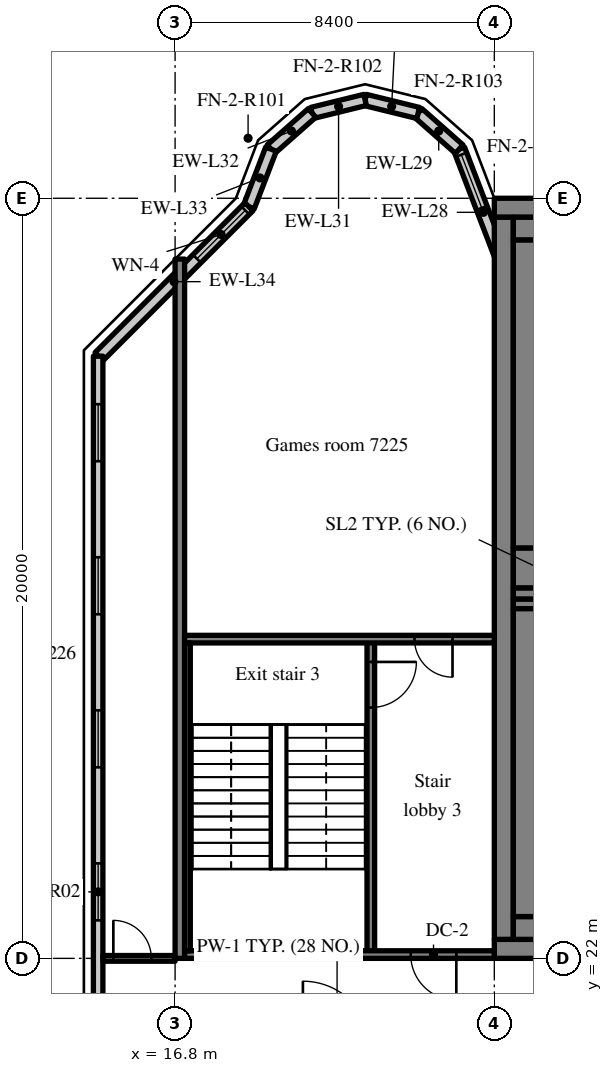
"""IFC4 building model, lengths in metres.
Left out: names, types, materials, properties, quantities, classifications, styles, units other than length and angle.
Written with IfcOpenShell. Run it as: python <this file> out.ifc"""

import sys

from ifc_helpers import new_model, si_unit, direction, frame, frame_2d, origin, place, context, subcontext, project, spatial, rectangle, extrude, source, transform, mapped, element, fill, save


model = new_model("IFC4")
c1 = context("Model", 3, precision=1e-05, world=origin(), true_north=direction((0.0, 1.0)))
c2 = subcontext(c1, "Body", "Model", "MODEL_VIEW")
j1 = project(units=[si_unit("LENGTHUNIT", "METRE"), si_unit("PLANEANGLEUNIT", "RADIAN")], contexts=[c1])
p1 = place(None, origin())
s1 = spatial("IfcSite", under=j1, at=p1, CompositionType="ELEMENT")
p2 = place(p1, origin())
s2 = spatial("IfcBuilding", under=s1, at=p2, CompositionType="ELEMENT")
p3 = place(p2, frame((0.0, 0.0, 301.7)))
s3 = spatial("IfcBuildingStorey", under=s2, at=p3, CompositionType="ELEMENT", Elevation=301.7)
m1 = source(origin(), c2, "Body", "SweptSolid", [
    extrude(rectangle(XDim=50.4, YDim=0.5, at=frame_2d((25.2, 0.0))), origin(), (0.0, 0.0, 1.0), 3.72),
])
p4 = place(p3, frame((25.2, 22.25, 0.0), z_axis=(0.0, 0.0, 1.0), x_axis=(1.0, 0.0, 0.0)))
e1 = element("IfcWall", 1, at=p4, inside=s3, PredefinedType="SHEAR", context=c2, shape_type="MappedRepresentation", body=[
    mapped(m1, transform((0.0, 0.0, 0.0), scale=1.0)),
])
m2 = source(origin(), c2, "Body", "SweptSolid", [
    extrude(rectangle(XDim=1.8, YDim=2.1, at=frame_2d((0.9, 1.05))), frame((0.0, 0.26, 0.0), z_axis=(0.0, -1.0, 0.0), x_axis=(1.0, 0.0, 0.0)), (0.0, 0.0, 1.0), 0.52),
])
p5 = place(p4, frame((15.9, 0.0, 0.0)))
e2 = element("IfcOpeningElement", 2, at=p5, cuts=e1, PredefinedType="OPENING", context=c2, shape_type="MappedRepresentation", body=[
    mapped(m2, transform((0.0, 0.0, 0.0), scale=1.0)),
])
m3 = source(origin(), c2, "Body", "SweptSolid", [
    extrude(rectangle(XDim=0.9, YDim=2.1, at=frame_2d((0.45, 1.05))), frame((0.0, 0.26, 0.0), z_axis=(0.0, -1.0, 0.0), x_axis=(1.0, 0.0, 0.0)), (0.0, 0.0, 1.0), 0.52),
])
p6 = place(p4, frame((11.175, 0.0, 0.0)))
e3 = element("IfcOpeningElement", 3, at=p6, cuts=e1, PredefinedType="OPENING", context=c2, shape_type="MappedRepresentation", body=[
    mapped(m3, transform((0.0, 0.0, 0.0), scale=1.0)),
])
p7 = place(p4, frame((21.525, 0.0, 0.0)))
e4 = element("IfcOpeningElement", 4, at=p7, cuts=e1, PredefinedType="OPENING", context=c2, shape_type="MappedRepresentation", body=[
    mapped(m3, transform((0.0, 0.0, 0.0), scale=1.0)),
])
p8 = place(p4, frame((32.7, 0.0, 0.0)))
e5 = element("IfcOpeningElement", 5, at=p8, cuts=e1, PredefinedType="OPENING", context=c2, shape_type="MappedRepresentation", body=[
    mapped(m2, transform((0.0, 0.0, 0.0), scale=1.0)),
])
m4 = source(origin(), c2, "Body", "SweptSolid", [
    extrude(rectangle(XDim=1.2, YDim=2.1, at=frame_2d((0.6, 1.05))), frame((0.0, 0.26, 0.0), z_axis=(0.0, -1.0, 0.0), x_axis=(1.0, 0.0, 0.0)), (0.0, 0.0, 1.0), 0.52),
])
p9 = place(p4, frame((6.5, 0.0, 0.0)))
e6 = element("IfcOpeningElement", 6, at=p9, cuts=e1, PredefinedType="OPENING", context=c2, shape_type="MappedRepresentation", body=[
    mapped(m4, transform((0.0, 0.0, 0.0), scale=1.0)),
])
p10 = place(p4, frame((47.975, 0.0, 0.0)))
e7 = element("IfcOpeningElement", 7, at=p10, cuts=e1, PredefinedType="OPENING", context=c2, shape_type="MappedRepresentation", body=[
    mapped(m4, transform((0.0, 0.0, 0.0), scale=1.0)),
])
p11 = place(p3, frame((25.2, 41.75, 0.0), z_axis=(0.0, 0.0, 1.0), x_axis=(1.0, 0.0, 0.0)))
e8 = element("IfcWall", 8, at=p11, inside=s3, PredefinedType="SHEAR", context=c2, shape_type="MappedRepresentation", body=[
    mapped(m1, transform((0.0, 0.0, 0.0), scale=1.0)),
])
m5 = source(origin(), c2, "Body", "SweptSolid", [
    extrude(rectangle(XDim=19.0, YDim=0.5, at=frame_2d((9.5, 0.0))), origin(), (0.0, 0.0, 1.0), 3.72),
])
p12 = place(p3, frame((25.45, 22.5, 0.0), z_axis=(0.0, 0.0, 1.0), x_axis=(0.0, 1.0, 0.0)))
e9 = element("IfcWall", 9, at=p12, inside=s3, PredefinedType="SHEAR", context=c2, shape_type="MappedRepresentation", body=[
    mapped(m5, transform((0.0, 0.0, 0.0), scale=1.0)),
])
m6 = source(origin(), c2, "Body", "SweptSolid", [
    extrude(rectangle(XDim=7.75, YDim=0.3, at=frame_2d((3.875, 0.0))), origin(), (0.0, 0.0, 1.0), 3.72),
])
p13 = place(p3, frame((25.7, 31.6, 0.0), z_axis=(0.0, 0.0, 1.0), x_axis=(1.0, 0.0, 0.0)))
e10 = element("IfcWall", 10, at=p13, inside=s3, PredefinedType="SHEAR", context=c2, shape_type="MappedRepresentation", body=[
    mapped(m6, transform((0.0, 0.0, 0.0), scale=1.0)),
])
m7 = source(origin(), c2, "Body", "SweptSolid", [
    extrude(rectangle(XDim=1.1, YDim=2.1, at=frame_2d((0.55, 1.05))), frame((0.0, 0.16, 0.0), z_axis=(0.0, -1.0, 0.0), x_axis=(1.0, 0.0, 0.0)), (0.0, 0.0, 1.0), 0.32),
])
p14 = place(p13, frame((6.05, 0.0, 0.0)))
e11 = element("IfcOpeningElement", 11, at=p14, cuts=e10, PredefinedType="OPENING", context=c2, shape_type="MappedRepresentation", body=[
    mapped(m7, transform((0.0, 0.0, 0.0), scale=1.0)),
])
m8 = source(origin(), c2, "Body", "SweptSolid", [
    extrude(rectangle(XDim=18.4, YDim=0.25, at=frame_2d((9.2, 0.0))), origin(), (0.0, 0.0, 1.0), 3.72),
])
p15 = place(p3, frame((16.925, 22.0, 0.0), z_axis=(0.0, 0.0, 1.0), x_axis=(0.0, 1.0, 0.0)))
e12 = element("IfcWall", 12, at=p15, inside=s3, PredefinedType="SHEAR", context=c2, shape_type="MappedRepresentation", body=[
    mapped(m8, transform((0.0, 0.0, 0.0), scale=1.0)),
])
m9 = source(origin(), c2, "Body", "SweptSolid", [
    extrude(rectangle(XDim=3.559, YDim=0.3, at=frame_2d((1.78, 0.0))), origin(), (0.0, 0.0, 1.0), 3.72),
])
p16 = place(p3, frame((25.55, 39.969, 0.0), z_axis=(0.0, 0.0, 1.0), x_axis=(-0.35779745313, 0.933799219604, 0.0)))
e13 = element("IfcWall", 13, at=p16, inside=s3, PredefinedType="SOLIDWALL", context=c2, shape_type="MappedRepresentation", body=[
    mapped(m9, transform((0.0, 0.0, 0.0), scale=1.0)),
])
m10 = source(origin(), c2, "Body", "SweptSolid", [
    extrude(rectangle(XDim=1.5, YDim=2.0, at=frame_2d((0.75, 1.0))), frame((0.0, 0.16, 0.0), z_axis=(0.0, -1.0, 0.0), x_axis=(1.0, 0.0, 0.0)), (0.0, 0.0, 1.0), 0.32),
])
p17 = place(p16, frame((1.903, 0.0, 0.9)))
e14 = element("IfcOpeningElement", 14, at=p17, cuts=e13, PredefinedType="OPENING", context=c2, shape_type="MappedRepresentation", body=[
    mapped(m10, transform((0.0, 0.0, 0.0), scale=1.0)),
])
m11 = source(origin(), c2, "Body", "SweptSolid", [
    extrude(rectangle(XDim=1.44, YDim=0.3, at=frame_2d((0.72, 0.0))), origin(), (0.0, 0.0, 1.0), 3.72),
])
p18 = place(p3, frame((24.277, 43.292, 0.0), z_axis=(0.0, 0.0, 1.0), x_axis=(-0.749649827867, 0.661834673902, 0.0)))
e15 = element("IfcWall", 15, at=p18, inside=s3, PredefinedType="SOLIDWALL", context=c2, shape_type="MappedRepresentation", body=[
    mapped(m11, transform((0.0, 0.0, 0.0), scale=1.0)),
])
m12 = source(origin(), c2, "Body", "SweptSolid", [
    extrude(rectangle(XDim=1.438, YDim=0.3, at=frame_2d((0.719, 0.0))), origin(), (0.0, 0.0, 1.0), 3.72),
])
p19 = place(p3, frame((23.197, 44.245, 0.0), z_axis=(0.0, 0.0, 1.0), x_axis=(-0.971152283879, 0.238460146601, 0.0)))
e16 = element("IfcWall", 16, at=p19, inside=s3, PredefinedType="SOLIDWALL", context=c2, shape_type="MappedRepresentation", body=[
    mapped(m12, transform((0.0, 0.0, 0.0), scale=1.0)),
])
m13 = source(origin(), c2, "Body", "SweptSolid", [
    extrude(rectangle(XDim=1.439, YDim=0.3, at=frame_2d((0.719, 0.0))), origin(), (0.0, 0.0, 1.0), 3.72),
])
p20 = place(p3, frame((21.8, 44.588, 0.0), z_axis=(0.0, 0.0, 1.0), x_axis=(-0.971161932466, -0.238420848351, 0.0)))
e17 = element("IfcWall", 17, at=p20, inside=s3, PredefinedType="SOLIDWALL", context=c2, shape_type="MappedRepresentation", body=[
    mapped(m13, transform((0.0, 0.0, 0.0), scale=1.0)),
])
m14 = source(origin(), c2, "Body", "SweptSolid", [
    extrude(rectangle(XDim=1.44, YDim=0.3, at=frame_2d((0.72, 0.0))), origin(), (0.0, 0.0, 1.0), 3.72),
])
p21 = place(p3, frame((20.403, 44.245, 0.0), z_axis=(0.0, 0.0, 1.0), x_axis=(-0.74957555648, -0.661918790432, 0.0)))
e18 = element("IfcWall", 18, at=p21, inside=s3, PredefinedType="SOLIDWALL", context=c2, shape_type="MappedRepresentation", body=[
    mapped(m14, transform((0.0, 0.0, 0.0), scale=1.0)),
])
m15 = source(origin(), c2, "Body", "SweptSolid", [
    extrude(rectangle(XDim=1.622, YDim=0.3, at=frame_2d((0.811, 0.0))), origin(), (0.0, 0.0, 1.0), 3.72),
])
p22 = place(p3, frame((19.323, 43.292, 0.0), z_axis=(0.0, 0.0, 1.0), x_axis=(-0.357778527068, -0.933806471154, 0.0)))
e19 = element("IfcWall", 19, at=p22, inside=s3, PredefinedType="SOLIDWALL", context=c2, shape_type="MappedRepresentation", body=[
    mapped(m15, transform((0.0, 0.0, 0.0), scale=1.0)),
])
m16 = source(origin(), c2, "Body", "SweptSolid", [
    extrude(rectangle(XDim=5.576, YDim=0.3, at=frame_2d((2.788, 0.0))), origin(), (0.0, 0.0, 1.0), 3.72),
])
p23 = place(p3, frame((18.743, 41.777, 0.0), z_axis=(0.0, 0.0, 1.0), x_axis=(-0.707106781187, -0.707106781187, 0.0)))
e20 = element("IfcWall", 20, at=p23, inside=s3, PredefinedType="SOLIDWALL", context=c2, shape_type="MappedRepresentation", body=[
    mapped(m16, transform((0.0, 0.0, 0.0), scale=1.0)),
])
m17 = source(origin(), c2, "Body", "SweptSolid", [
    extrude(rectangle(XDim=1.8, YDim=1.5, at=frame_2d((0.9, 0.75))), frame((0.0, 0.16, 0.0), z_axis=(0.0, -1.0, 0.0), x_axis=(1.0, 0.0, 0.0)), (0.0, 0.0, 1.0), 0.32),
])
p24 = place(p23, frame((0.135, 0.0, 0.9)))
e21 = element("IfcOpeningElement", 21, at=p24, cuts=e20, PredefinedType="OPENING", context=c2, shape_type="MappedRepresentation", body=[
    mapped(m17, transform((0.0, 0.0, 0.0), scale=1.0)),
])
m18 = source(origin(), c2, "Body", "SweptSolid", [
    extrude(rectangle(XDim=28.189, YDim=0.25, at=frame_2d((14.095, 0.0))), origin(), (0.0, 0.0, 1.0), 3.72),
])
p25 = place(p3, frame((14.775, 37.845, 0.0), z_axis=(0.0, 0.0, 1.0), x_axis=(0.0, -1.0, 0.0)))
e22 = element("IfcWall", 22, at=p25, inside=s3, PredefinedType="SOLIDWALL", context=c2, shape_type="MappedRepresentation", body=[
    mapped(m18, transform((0.0, 0.0, 0.0), scale=1.0)),
])
m19 = source(origin(), c2, "Body", "SweptSolid", [
    extrude(rectangle(XDim=1.5, YDim=1.5, at=frame_2d((0.75, 0.75))), frame((0.0, 0.135, 0.0), z_axis=(0.0, -1.0, 0.0), x_axis=(1.0, 0.0, 0.0)), (0.0, 0.0, 1.0), 0.27),
])
p26 = place(p25, frame((1.263, 0.0, 0.9)))
e23 = element("IfcOpeningElement", 23, at=p26, cuts=e22, PredefinedType="OPENING", context=c2, shape_type="MappedRepresentation", body=[
    mapped(m19, transform((0.0, 0.0, 0.0), scale=1.0)),
])
p27 = place(p25, frame((5.291, 0.0, 0.9)))
e24 = element("IfcOpeningElement", 24, at=p27, cuts=e22, PredefinedType="OPENING", context=c2, shape_type="MappedRepresentation", body=[
    mapped(m19, transform((0.0, 0.0, 0.0), scale=1.0)),
])
p28 = place(p25, frame((9.318, 0.0, 0.9)))
e25 = element("IfcOpeningElement", 25, at=p28, cuts=e22, PredefinedType="OPENING", context=c2, shape_type="MappedRepresentation", body=[
    mapped(m19, transform((0.0, 0.0, 0.0), scale=1.0)),
])
p29 = place(p25, frame((13.345, 0.0, 0.9)))
e26 = element("IfcOpeningElement", 26, at=p29, cuts=e22, PredefinedType="OPENING", context=c2, shape_type="MappedRepresentation", body=[
    mapped(m19, transform((0.0, 0.0, 0.0), scale=1.0)),
])
p30 = place(p25, frame((17.372, 0.0, 0.9)))
e27 = element("IfcOpeningElement", 27, at=p30, cuts=e22, PredefinedType="OPENING", context=c2, shape_type="MappedRepresentation", body=[
    mapped(m19, transform((0.0, 0.0, 0.0), scale=1.0)),
])
p31 = place(p25, frame((21.399, 0.0, 0.9)))
e28 = element("IfcOpeningElement", 28, at=p31, cuts=e22, PredefinedType="OPENING", context=c2, shape_type="MappedRepresentation", body=[
    mapped(m19, transform((0.0, 0.0, 0.0), scale=1.0)),
])
p32 = place(p25, frame((25.426, 0.0, 0.9)))
e29 = element("IfcOpeningElement", 29, at=p32, cuts=e22, PredefinedType="OPENING", context=c2, shape_type="MappedRepresentation", body=[
    mapped(m19, transform((0.0, 0.0, 0.0), scale=1.0)),
])
m20 = source(origin(), c2, "Body", "SweptSolid", [
    extrude(rectangle(XDim=8.3, YDim=0.2, at=frame_2d((4.15, 0.0))), origin(), (0.0, 0.0, 1.0), 3.72),
])
p33 = place(p3, frame((21.95, 22.1, 0.0), z_axis=(0.0, 0.0, 1.0), x_axis=(0.0, 1.0, 0.0)))
e30 = element("IfcWall", 30, at=p33, inside=s3, PredefinedType="SOLIDWALL", context=c2, shape_type="MappedRepresentation", body=[
    mapped(m20, transform((0.0, 0.0, 0.0), scale=1.0)),
])
m21 = source(origin(), c2, "Body", "SweptSolid", [
    extrude(rectangle(XDim=1.2, YDim=2.1, at=frame_2d((0.6, 1.05))), frame((0.0, 0.11, 0.0), z_axis=(0.0, -1.0, 0.0), x_axis=(1.0, 0.0, 0.0)), (0.0, 0.0, 1.0), 0.22),
])
p34 = place(p33, frame((6.5, 0.0, 0.0)))
e31 = element("IfcOpeningElement", 31, at=p34, cuts=e30, PredefinedType="OPENING", context=c2, shape_type="MappedRepresentation", body=[
    mapped(m21, transform((0.0, 0.0, 0.0), scale=1.0)),
])
m22 = source(origin(), c2, "Body", "SweptSolid", [
    extrude(rectangle(XDim=8.15, YDim=0.2, at=frame_2d((4.075, 0.0))), origin(), (0.0, 0.0, 1.0), 3.72),
])
p35 = place(p3, frame((17.05, 22.1, 0.0), z_axis=(0.0, 0.0, 1.0), x_axis=(1.0, 0.0, 0.0)))
e32 = element("IfcWall", 32, at=p35, inside=s3, PredefinedType="SOLIDWALL", context=c2, shape_type="MappedRepresentation", body=[
    mapped(m22, transform((0.0, 0.0, 0.0), scale=1.0)),
])
p36 = place(p35, frame((5.95, 0.0, 0.0)))
e33 = element("IfcOpeningElement", 33, at=p36, cuts=e32, PredefinedType="OPENING", context=c2, shape_type="MappedRepresentation", body=[
    mapped(m21, transform((0.0, 0.0, 0.0), scale=1.0)),
])
p37 = place(p3, frame((17.05, 30.4, 0.0), z_axis=(0.0, 0.0, 1.0), x_axis=(1.0, 0.0, 0.0)))
e34 = element("IfcWall", 34, at=p37, inside=s3, PredefinedType="SOLIDWALL", context=c2, shape_type="MappedRepresentation", body=[
    mapped(m22, transform((0.0, 0.0, 0.0), scale=1.0)),
])
m23 = source(origin(), c2, "Body", "SweptSolid", [
    extrude(rectangle(XDim=1.0, YDim=2.1, at=frame_2d((0.5, 1.05))), frame((0.0, 0.11, 0.0), z_axis=(0.0, -1.0, 0.0), x_axis=(1.0, 0.0, 0.0)), (0.0, 0.0, 1.0), 0.22),
])
p38 = place(p37, frame((6.05, 0.0, 0.0)))
e35 = element("IfcOpeningElement", 35, at=p38, cuts=e34, PredefinedType="OPENING", context=c2, shape_type="MappedRepresentation", body=[
    mapped(m23, transform((0.0, 0.0, 0.0), scale=1.0)),
])
m24 = source(origin(), c2, "Body", "SweptSolid", [
    extrude(rectangle(XDim=5.25, YDim=0.6, at=frame_2d((2.625, 0.0))), origin(), (0.0, 0.0, 1.0), 3.72),
])
p39 = place(p3, frame((25.7, 22.8, 0.0), z_axis=(0.0, 0.0, 1.0), x_axis=(1.0, 0.0, 0.0)))
e36 = element("IfcWall", 36, at=p39, inside=s3, PredefinedType="SOLIDWALL", context=c2, shape_type="MappedRepresentation", body=[
    mapped(m24, transform((0.0, 0.0, 0.0), scale=1.0)),
])
m25 = source(origin(), c2, "Body", "SweptSolid", [
    extrude(rectangle(XDim=5.25, YDim=0.25, at=frame_2d((2.625, 0.0))), origin(), (0.0, 0.0, 1.0), 3.72),
])
p40 = place(p3, frame((25.7, 31.325, 0.0), z_axis=(0.0, 0.0, 1.0), x_axis=(1.0, 0.0, 0.0)))
e37 = element("IfcWall", 37, at=p40, inside=s3, PredefinedType="SOLIDWALL", context=c2, shape_type="MappedRepresentation", body=[
    mapped(m25, transform((0.0, 0.0, 0.0), scale=1.0)),
])
m26 = source(origin(), c2, "Body", "SweptSolid", [
    extrude(rectangle(XDim=8.1, YDim=0.6, at=frame_2d((4.05, 0.0))), origin(), (0.0, 0.0, 1.0), 3.72),
])
p41 = place(p3, frame((26.0, 23.1, 0.0), z_axis=(0.0, 0.0, 1.0), x_axis=(0.0, 1.0, 0.0)))
e38 = element("IfcWall", 38, at=p41, inside=s3, PredefinedType="SOLIDWALL", context=c2, shape_type="MappedRepresentation", body=[
    mapped(m26, transform((0.0, 0.0, 0.0), scale=1.0)),
])
m27 = source(origin(), c2, "Body", "SweptSolid", [
    extrude(rectangle(XDim=8.1, YDim=0.15, at=frame_2d((4.05, 0.0))), origin(), (0.0, 0.0, 1.0), 3.72),
])
p42 = place(p3, frame((17.125, 22.2, 0.0), z_axis=(0.0, 0.0, 1.0), x_axis=(0.0, 1.0, 0.0)))
e39 = element("IfcWall", 39, at=p42, inside=s3, PredefinedType="SOLIDWALL", context=c2, shape_type="MappedRepresentation", body=[
    mapped(m27, transform((0.0, 0.0, 0.0), scale=1.0)),
])
p43 = place(p3, frame((25.7, 41.2, 0.0), z_axis=(0.0, 0.0, 1.0), x_axis=(1.0, 0.0, 0.0)))
e40 = element("IfcWall", 40, at=p43, inside=s3, PredefinedType="SOLIDWALL", context=c2, shape_type="MappedRepresentation", body=[
    mapped(m24, transform((0.0, 0.0, 0.0), scale=1.0)),
])
m28 = source(origin(), c2, "Body", "SweptSolid", [
    extrude(rectangle(XDim=5.25, YDim=1.05, at=frame_2d((2.625, 0.0))), origin(), (0.0, 0.0, 1.0), 3.72),
])
p44 = place(p3, frame((25.7, 32.275, 0.0), z_axis=(0.0, 0.0, 1.0), x_axis=(1.0, 0.0, 0.0)))
e41 = element("IfcWall", 41, at=p44, inside=s3, PredefinedType="SOLIDWALL", context=c2, shape_type="MappedRepresentation", body=[
    mapped(m28, transform((0.0, 0.0, 0.0), scale=1.0)),
])
p45 = place(p3, frame((26.0, 32.8, 0.0), z_axis=(0.0, 0.0, 1.0), x_axis=(0.0, 1.0, 0.0)))
e42 = element("IfcWall", 42, at=p45, inside=s3, PredefinedType="SOLIDWALL", context=c2, shape_type="MappedRepresentation", body=[
    mapped(m26, transform((0.0, 0.0, 0.0), scale=1.0)),
])
m29 = source(origin(), c2, "Body", "SweptSolid", [
    extrude(rectangle(XDim=1.9, YDim=0.15, at=frame_2d((0.95, 0.0))), origin(), (0.0, 0.0, 1.0), 3.02),
])
p46 = place(p3, frame((14.9, 22.0, 0.0), z_axis=(0.0, 0.0, 1.0), x_axis=(1.0, 0.0, 0.0)))
e43 = element("IfcWall", 43, at=p46, inside=s3, PredefinedType="PARTITIONING", context=c2, shape_type="MappedRepresentation", body=[
    mapped(m29, transform((0.0, 0.0, 0.0), scale=1.0)),
])
m30 = source(origin(), c2, "Body", "SweptSolid", [
    extrude(rectangle(XDim=1.0, YDim=2.1, at=frame_2d((0.5, 1.05))), frame((0.0, 0.085, 0.0), z_axis=(0.0, -1.0, 0.0), x_axis=(1.0, 0.0, 0.0)), (0.0, 0.0, 1.0), 0.17),
])
p47 = place(p46, frame((0.275, 0.0, 0.0)))
e44 = element("IfcOpeningElement", 44, at=p47, cuts=e43, PredefinedType="OPENING", context=c2, shape_type="MappedRepresentation", body=[
    mapped(m30, transform((0.0, 0.0, 0.0), scale=1.0)),
])
m31 = source(origin(), c2, "Body", "SweptSolid", [
    extrude(rectangle(XDim=1.5, YDim=2.0, at=frame_2d((0.75, 1.0))), frame((0.0, 0.03, 0.0), z_axis=(0.0, -1.0, 0.0), x_axis=(1.0, 0.0, 0.0)), (0.0, 0.0, 1.0), 0.06),
])
p48 = place(p17, origin())
e45 = element("IfcWindow", 45, at=p48, inside=s3, PartitioningType="SINGLE_PANEL", PredefinedType="WINDOW", context=c2, shape_type="MappedRepresentation", body=[
    mapped(m31, transform((0.0, 0.0, 0.0), scale=1.0)),
])
fill(e14, e45)
m32 = source(origin(), c2, "Body", "SweptSolid", [
    extrude(rectangle(XDim=1.8, YDim=1.5, at=frame_2d((0.9, 0.75))), frame((0.0, 0.03, 0.0), z_axis=(0.0, -1.0, 0.0), x_axis=(1.0, 0.0, 0.0)), (0.0, 0.0, 1.0), 0.06),
])
p49 = place(p24, origin())
e46 = element("IfcWindow", 46, at=p49, inside=s3, PartitioningType="SINGLE_PANEL", PredefinedType="WINDOW", context=c2, shape_type="MappedRepresentation", body=[
    mapped(m32, transform((0.0, 0.0, 0.0), scale=1.0)),
])
fill(e21, e46)
m33 = source(origin(), c2, "Body", "SweptSolid", [
    extrude(rectangle(XDim=1.5, YDim=1.5, at=frame_2d((0.75, 0.75))), frame((0.0, 0.03, 0.0), z_axis=(0.0, -1.0, 0.0), x_axis=(1.0, 0.0, 0.0)), (0.0, 0.0, 1.0), 0.06),
])
p50 = place(p26, origin())
e47 = element("IfcWindow", 47, at=p50, inside=s3, PartitioningType="SINGLE_PANEL", PredefinedType="WINDOW", context=c2, shape_type="MappedRepresentation", body=[
    mapped(m33, transform((0.0, 0.0, 0.0), scale=1.0)),
])
fill(e23, e47)
p51 = place(p27, origin())
e48 = element("IfcWindow", 48, at=p51, inside=s3, PartitioningType="SINGLE_PANEL", PredefinedType="WINDOW", context=c2, shape_type="MappedRepresentation", body=[
    mapped(m33, transform((0.0, 0.0, 0.0), scale=1.0)),
])
fill(e24, e48)
p52 = place(p28, origin())
e49 = element("IfcWindow", 49, at=p52, inside=s3, PartitioningType="SINGLE_PANEL", PredefinedType="WINDOW", context=c2, shape_type="MappedRepresentation", body=[
    mapped(m33, transform((0.0, 0.0, 0.0), scale=1.0)),
])
fill(e25, e49)
p53 = place(p29, origin())
e50 = element("IfcWindow", 50, at=p53, inside=s3, PartitioningType="SINGLE_PANEL", PredefinedType="WINDOW", context=c2, shape_type="MappedRepresentation", body=[
    mapped(m33, transform((0.0, 0.0, 0.0), scale=1.0)),
])
fill(e26, e50)
m34 = source(origin(), c2, "Body", "SweptSolid", [
    extrude(rectangle(XDim=1.2, YDim=2.1, at=frame_2d((0.6, 1.05))), frame((0.0, 0.025, 0.0), z_axis=(0.0, -1.0, 0.0), x_axis=(1.0, 0.0, 0.0)), (0.0, 0.0, 1.0), 0.05),
])
p54 = place(p34, origin())
e51 = element("IfcDoor", 51, at=p54, inside=s3, OperationType="SINGLE_SWING_RIGHT", PredefinedType="DOOR", context=c2, shape_type="MappedRepresentation", body=[
    mapped(m34, transform((0.0, 0.0, 0.0), scale=1.0)),
])
fill(e31, e51)
p55 = place(p36, origin())
e52 = element("IfcDoor", 52, at=p55, inside=s3, OperationType="SINGLE_SWING_RIGHT", PredefinedType="DOOR", context=c2, shape_type="MappedRepresentation", body=[
    mapped(m34, transform((0.0, 0.0, 0.0), scale=1.0)),
])
fill(e33, e52)
m35 = source(origin(), c2, "Body", "SweptSolid", [
    extrude(rectangle(XDim=1.0, YDim=2.1, at=frame_2d((0.5, 1.05))), frame((0.0, 0.025, 0.0), z_axis=(0.0, -1.0, 0.0), x_axis=(1.0, 0.0, 0.0)), (0.0, 0.0, 1.0), 0.05),
])
p56 = place(p38, origin())
e53 = element("IfcDoor", 53, at=p56, inside=s3, OperationType="SINGLE_SWING_RIGHT", PredefinedType="DOOR", context=c2, shape_type="MappedRepresentation", body=[
    mapped(m35, transform((0.0, 0.0, 0.0), scale=1.0)),
])
fill(e35, e53)
p57 = place(p47, origin())
e54 = element("IfcDoor", 54, at=p57, inside=s3, OperationType="SINGLE_SWING_LEFT", PredefinedType="DOOR", context=c2, shape_type="MappedRepresentation", body=[
    mapped(m35, transform((0.0, 0.0, 0.0), scale=1.0)),
])
fill(e44, e54)
save(model, sys.argv[1])
